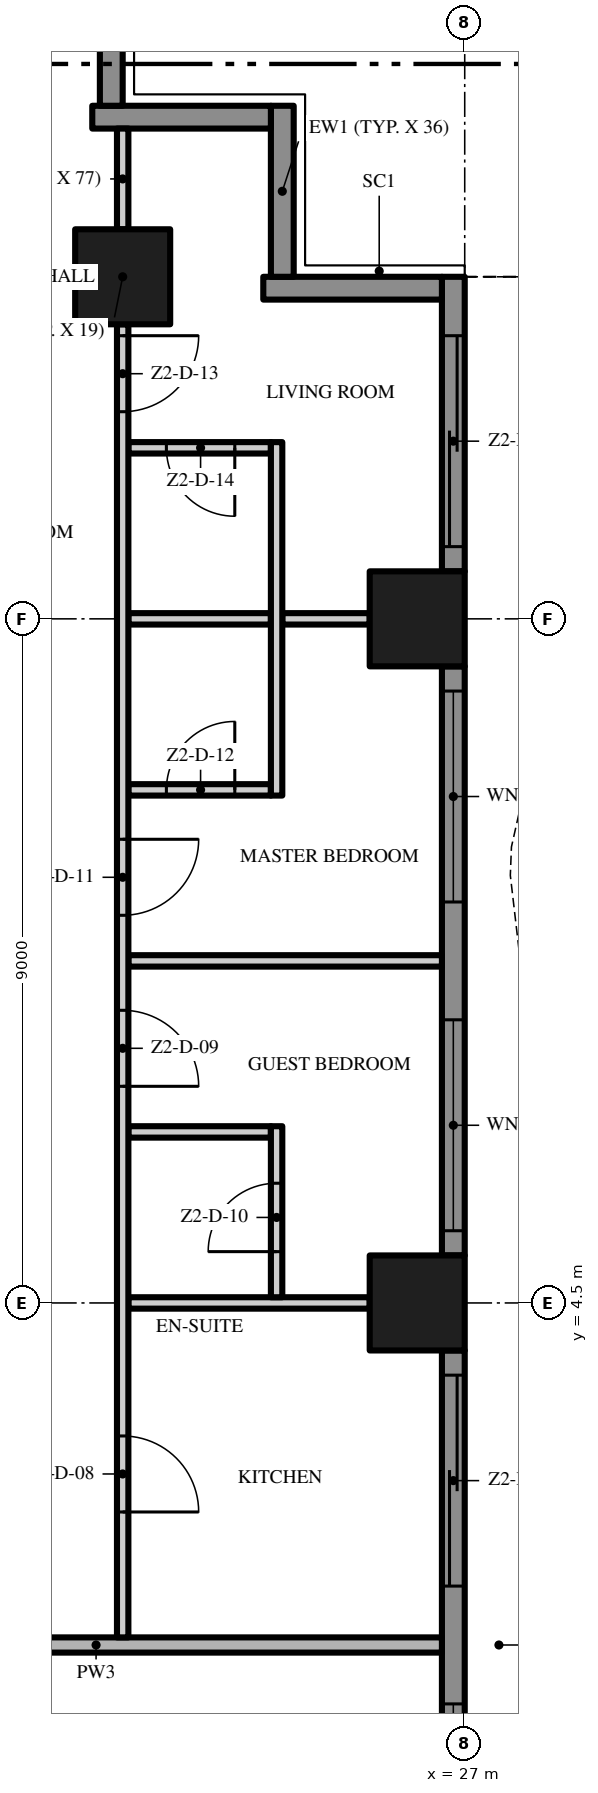
"""IFC4 building model, lengths in metres.
Left out: names, types, materials, properties, quantities, classifications, styles, units other than length and angle.
Written with IfcOpenShell. Run it as: python <this file> out.ifc"""

import sys

from ifc_helpers import new_model, si_unit, direction, frame, frame_2d, origin, origin_2d, place, context, subcontext, project, spatial, polyline, rectangle, outline, extrude, element, fill, save


model = new_model("IFC4")
c1 = context("Model", 3, precision=1e-05, world=origin(), true_north=direction((0.0, 1.0)))
c2 = subcontext(c1, "Body", "Model", "MODEL_VIEW")
j1 = project(units=[si_unit("LENGTHUNIT", "METRE"), si_unit("PLANEANGLEUNIT", "RADIAN")], contexts=[c1])
p1 = place(None, origin())
s1 = spatial("IfcSite", under=j1, at=p1, CompositionType="ELEMENT")
p2 = place(p1, origin())
s2 = spatial("IfcBuilding", under=s1, at=p2, CompositionType="ELEMENT")
p3 = place(p2, frame((0.0, 0.0, 103.6)))
s3 = spatial("IfcBuildingStorey", under=s2, at=p3, CompositionType="ELEMENT", Elevation=103.6)
for number, where, z_axis, x_axis in (
    (1, (26.375, 13.5, 0.0), (0.0, 0.0, 1.0), (1.0, 0.0, 0.0)),
    (2, (22.5, 18.0, 0.0), (0.0, 0.0, 1.0), (1.0, 0.0, 0.0)),
    (3, (26.375, 4.5, 0.0), (0.0, 0.0, 1.0), (1.0, 0.0, 0.0)),
):
    element("IfcColumn", number, at=place(p3, frame(where, z_axis=z_axis, x_axis=x_axis)), inside=s3, PredefinedType="COLUMN", context=c2, shape_type="SweptSolid", body=[
        extrude(rectangle(XDim=1.25, YDim=1.25, at=origin_2d()), origin(), (0.0, 0.0, 1.0), 3.5),
    ])
p4 = place(p3, frame((26.85, 3.875, 0.0), z_axis=(0.0, 0.0, 1.0), x_axis=(0.0, -1.0, 0.0)))
e4 = element("IfcWall", 4, at=p4, inside=s3, PredefinedType="SOLIDWALL", context=c2, shape_type="SweptSolid", body=[
    extrude(rectangle(XDim=7.75, YDim=0.3, at=frame_2d((3.875, 0.0))), origin(), (0.0, 0.0, 1.0), 3.5),
])
p5 = place(p4, frame((4.65, 0.0, 0.45)))
e5 = element("IfcOpeningElement", 5, at=p5, cuts=e4, PredefinedType="OPENING", context=c2, shape_type="SweptSolid", body=[
    extrude(rectangle(XDim=2.775, YDim=2.65, at=frame_2d((1.387, 1.325))), frame((0.0, 0.16, 0.0), z_axis=(0.0, -1.0, 0.0), x_axis=(1.0, 0.0, 0.0)), (0.0, 0.0, 1.0), 0.32),
])
p6 = place(p4, frame((0.325, 0.0, 0.0)))
e6 = element("IfcOpeningElement", 6, at=p6, cuts=e4, PredefinedType="OPENING", context=c2, shape_type="SweptSolid", body=[
    extrude(rectangle(XDim=2.775, YDim=2.4, at=frame_2d((1.387, 1.2))), frame((0.0, 0.16, 0.0), z_axis=(0.0, -1.0, 0.0), x_axis=(1.0, 0.0, 0.0)), (0.0, 0.0, 1.0), 0.32),
])
p7 = place(p3, frame((26.85, 12.875, 0.0), z_axis=(0.0, 0.0, 1.0), x_axis=(0.0, -1.0, 0.0)))
e7 = element("IfcWall", 7, at=p7, inside=s3, PredefinedType="SOLIDWALL", context=c2, shape_type="SweptSolid", body=[
    extrude(rectangle(XDim=7.75, YDim=0.3, at=frame_2d((3.875, 0.0))), origin(), (0.0, 0.0, 1.0), 3.5),
])
p8 = place(p7, frame((4.65, 0.0, 0.45)))
e8 = element("IfcOpeningElement", 8, at=p8, cuts=e7, PredefinedType="OPENING", context=c2, shape_type="SweptSolid", body=[
    extrude(rectangle(XDim=2.775, YDim=2.65, at=frame_2d((1.387, 1.325))), frame((0.0, 0.16, 0.0), z_axis=(0.0, -1.0, 0.0), x_axis=(1.0, 0.0, 0.0)), (0.0, 0.0, 1.0), 0.32),
])
p9 = place(p7, frame((0.325, 0.0, 0.45)))
e9 = element("IfcOpeningElement", 9, at=p9, cuts=e7, PredefinedType="OPENING", context=c2, shape_type="SweptSolid", body=[
    extrude(rectangle(XDim=2.775, YDim=2.65, at=frame_2d((1.387, 1.325))), frame((0.0, 0.16, 0.0), z_axis=(0.0, -1.0, 0.0), x_axis=(1.0, 0.0, 0.0)), (0.0, 0.0, 1.0), 0.32),
])
p10 = place(p3, frame((26.85, 18.0, 0.0), z_axis=(0.0, 0.0, 1.0), x_axis=(0.0, -1.0, 0.0)))
e10 = element("IfcWall", 10, at=p10, inside=s3, PredefinedType="SOLIDWALL", context=c2, shape_type="SweptSolid", body=[
    extrude(rectangle(XDim=3.875, YDim=0.3, at=frame_2d((1.938, 0.0))), origin(), (0.0, 0.0, 1.0), 3.5),
])
p11 = place(p10, frame((0.775, 0.0, 0.0)))
e11 = element("IfcOpeningElement", 11, at=p11, cuts=e10, PredefinedType="OPENING", context=c2, shape_type="SweptSolid", body=[
    extrude(rectangle(XDim=2.775, YDim=2.4, at=frame_2d((1.387, 1.2))), frame((0.0, 0.16, 0.0), z_axis=(0.0, -1.0, 0.0), x_axis=(1.0, 0.0, 0.0)), (0.0, 0.0, 1.0), 0.32),
])
p12 = place(p3, frame((24.35, 17.85, 0.0), z_axis=(0.0, 0.0, 1.0), x_axis=(1.0, 0.0, 0.0)))
e12 = element("IfcWall", 12, at=p12, inside=s3, PredefinedType="SOLIDWALL", context=c2, shape_type="SweptSolid", body=[
    extrude(rectangle(XDim=2.35, YDim=0.3, at=frame_2d((1.175, 0.0))), origin(), (0.0, 0.0, 1.0), 3.5),
])
p13 = place(p3, frame((24.6, 20.25, 0.0), z_axis=(0.0, 0.0, 1.0), x_axis=(0.0, -1.0, 0.0)))
e13 = element("IfcWall", 13, at=p13, inside=s3, PredefinedType="SOLIDWALL", context=c2, shape_type="SweptSolid", body=[
    extrude(rectangle(XDim=2.25, YDim=0.3, at=frame_2d((1.125, 0.0))), origin(), (0.0, 0.0, 1.0), 3.5),
])
p14 = place(p3, frame((22.1, 20.1, 0.0), z_axis=(0.0, 0.0, 1.0), x_axis=(1.0, 0.0, 0.0)))
e14 = element("IfcWall", 14, at=p14, inside=s3, PredefinedType="SOLIDWALL", context=c2, shape_type="SweptSolid", body=[
    extrude(rectangle(XDim=2.35, YDim=0.3, at=frame_2d((1.175, 0.0))), origin(), (0.0, 0.0, 1.0), 3.5),
])
p15 = place(p3, frame((22.35, 22.5, 0.0), z_axis=(0.0, 0.0, 1.0), x_axis=(0.0, -1.0, 0.0)))
e15 = element("IfcWall", 15, at=p15, inside=s3, PredefinedType="SOLIDWALL", context=c2, shape_type="SweptSolid", body=[
    extrude(rectangle(XDim=2.25, YDim=0.3, at=frame_2d((1.125, 0.0))), origin(), (0.0, 0.0, 1.0), 3.5),
])
p16 = place(p3, origin())
e16 = element("IfcWall", 16, at=p16, inside=s3, PredefinedType="USERDEFINED", context=c2, shape_type="SweptSolid", body=[
    extrude(outline(polyline([(27.951, -18.0), (28.612, -16.5), (29.345, -15.0), (29.869, -13.5), (30.0, -12.375), (29.985, -12.0), (29.649, -10.5), (28.988, -9.0), (28.255, -7.5), (27.731, -6.0), (27.6, -4.875), (27.615, -4.5), (27.951, -3.0), (28.612, -1.5), (29.345, 0.0), (29.869, 1.5), (30.0, 2.625), (29.985, 3.0), (29.649, 4.5), (28.988, 6.0), (28.255, 7.5), (27.731, 9.0), (27.6, 10.125), (27.615, 10.5), (27.951, 12.0), (28.612, 13.5), (29.345, 15.0), (29.869, 16.5), (30.0, 17.625), (29.985, 18.0), (29.735, 17.99), (29.749, 17.635), (29.624, 16.556), (29.114, 15.096), (28.385, 13.605), (27.713, 12.079), (27.366, 10.533), (27.349, 10.115), (27.486, 8.944), (28.024, 7.404), (28.761, 5.895), (29.41, 4.421), (29.736, 2.967), (29.749, 2.635), (29.624, 1.556), (29.114, 0.096), (28.385, -1.395), (27.713, -2.921), (27.366, -4.467), (27.349, -4.885), (27.486, -6.056), (28.024, -7.596), (28.761, -9.105), (29.41, -10.579), (29.736, -12.033), (29.749, -12.365), (29.624, -13.444), (29.114, -14.904), (28.385, -16.395), (27.723, -17.899), (27.951, -18.0)])), origin(), (0.0, 0.0, 1.0), 0.9),
])
p17 = place(p3, frame((17.6, 0.0, 0.0), z_axis=(0.0, 0.0, 1.0), x_axis=(1.0, 0.0, 0.0)))
e17 = element("IfcWall", 17, at=p17, inside=s3, PredefinedType="PARTITIONING", context=c2, shape_type="SweptSolid", body=[
    extrude(rectangle(XDim=9.1, YDim=0.2, at=frame_2d((4.55, 0.0))), origin(), (0.0, 0.0, 1.0), 3.5),
])
p18 = place(p3, frame((22.575, 4.5, 0.0), z_axis=(0.0, 0.0, 1.0), x_axis=(1.0, 0.0, 0.0)))
e18 = element("IfcWall", 18, at=p18, inside=s3, PredefinedType="PARTITIONING", context=c2, shape_type="SweptSolid", body=[
    extrude(rectangle(XDim=3.175, YDim=0.15, at=frame_2d((1.587, 0.0))), origin(), (0.0, 0.0, 1.0), 3.5),
])
p19 = place(p3, frame((22.575, 6.75, 0.0), z_axis=(0.0, 0.0, 1.0), x_axis=(1.0, 0.0, 0.0)))
e19 = element("IfcWall", 19, at=p19, inside=s3, PredefinedType="PARTITIONING", context=c2, shape_type="SweptSolid", body=[
    extrude(rectangle(XDim=1.875, YDim=0.15, at=frame_2d((0.938, 0.0))), origin(), (0.0, 0.0, 1.0), 3.5),
])
p20 = place(p3, frame((22.575, 9.0, 0.0), z_axis=(0.0, 0.0, 1.0), x_axis=(1.0, 0.0, 0.0)))
e20 = element("IfcWall", 20, at=p20, inside=s3, PredefinedType="PARTITIONING", context=c2, shape_type="SweptSolid", body=[
    extrude(rectangle(XDim=4.125, YDim=0.15, at=frame_2d((2.062, 0.0))), origin(), (0.0, 0.0, 1.0), 3.5),
])
p21 = place(p3, frame((22.575, 11.25, 0.0), z_axis=(0.0, 0.0, 1.0), x_axis=(1.0, 0.0, 0.0)))
e21 = element("IfcWall", 21, at=p21, inside=s3, PredefinedType="PARTITIONING", context=c2, shape_type="SweptSolid", body=[
    extrude(rectangle(XDim=1.875, YDim=0.15, at=frame_2d((0.938, 0.0))), origin(), (0.0, 0.0, 1.0), 3.5),
])
p22 = place(p21, frame((0.5, 0.0, 0.0)))
e22 = element("IfcOpeningElement", 22, at=p22, cuts=e21, PredefinedType="OPENING", context=c2, shape_type="SweptSolid", body=[
    extrude(rectangle(XDim=0.9, YDim=2.1, at=frame_2d((0.45, 1.05))), frame((0.0, 0.085, 0.0), z_axis=(0.0, -1.0, 0.0), x_axis=(1.0, 0.0, 0.0)), (0.0, 0.0, 1.0), 0.17),
])
p23 = place(p3, frame((22.575, 13.5, 0.0), z_axis=(0.0, 0.0, 1.0), x_axis=(1.0, 0.0, 0.0)))
e23 = element("IfcWall", 23, at=p23, inside=s3, PredefinedType="PARTITIONING", context=c2, shape_type="SweptSolid", body=[
    extrude(rectangle(XDim=1.875, YDim=0.15, at=frame_2d((0.938, 0.0))), origin(), (0.0, 0.0, 1.0), 3.5),
])
p24 = place(p3, frame((24.6, 13.5, 0.0), z_axis=(0.0, 0.0, 1.0), x_axis=(1.0, 0.0, 0.0)))
e24 = element("IfcWall", 24, at=p24, inside=s3, PredefinedType="PARTITIONING", context=c2, shape_type="SweptSolid", body=[
    extrude(rectangle(XDim=1.15, YDim=0.15, at=frame_2d((0.575, 0.0))), origin(), (0.0, 0.0, 1.0), 3.5),
])
p25 = place(p3, frame((24.45, 15.75, 0.0), z_axis=(0.0, 0.0, 1.0), x_axis=(-1.0, 0.0, 0.0)))
e25 = element("IfcWall", 25, at=p25, inside=s3, PredefinedType="PARTITIONING", context=c2, shape_type="SweptSolid", body=[
    extrude(rectangle(XDim=1.875, YDim=0.15, at=frame_2d((0.938, 0.0))), origin(), (0.0, 0.0, 1.0), 3.5),
])
p26 = place(p25, frame((0.475, 0.0, 0.0)))
e26 = element("IfcOpeningElement", 26, at=p26, cuts=e25, PredefinedType="OPENING", context=c2, shape_type="SweptSolid", body=[
    extrude(rectangle(XDim=0.9, YDim=2.1, at=frame_2d((0.45, 1.05))), frame((0.0, 0.085, 0.0), z_axis=(0.0, -1.0, 0.0), x_axis=(1.0, 0.0, 0.0)), (0.0, 0.0, 1.0), 0.17),
])
p27 = place(p3, frame((22.5, 17.375, 0.0), z_axis=(0.0, 0.0, 1.0), x_axis=(0.0, -1.0, 0.0)))
e27 = element("IfcWall", 27, at=p27, inside=s3, PredefinedType="PARTITIONING", context=c2, shape_type="SweptSolid", body=[
    extrude(rectangle(XDim=17.275, YDim=0.15, at=frame_2d((8.637, 0.0))), origin(), (0.0, 0.0, 1.0), 3.5),
])
p28 = place(p27, frame((14.625, 0.0, 0.0)))
e28 = element("IfcOpeningElement", 28, at=p28, cuts=e27, PredefinedType="OPENING", context=c2, shape_type="SweptSolid", body=[
    extrude(rectangle(XDim=1.0, YDim=2.4, at=frame_2d((0.5, 1.2))), frame((0.0, 0.085, 0.0), z_axis=(0.0, -1.0, 0.0), x_axis=(1.0, 0.0, 0.0)), (0.0, 0.0, 1.0), 0.17),
])
p29 = place(p27, frame((9.025, 0.0, 0.0)))
e29 = element("IfcOpeningElement", 29, at=p29, cuts=e27, PredefinedType="OPENING", context=c2, shape_type="SweptSolid", body=[
    extrude(rectangle(XDim=1.0, YDim=2.4, at=frame_2d((0.5, 1.2))), frame((0.0, 0.085, 0.0), z_axis=(0.0, -1.0, 0.0), x_axis=(1.0, 0.0, 0.0)), (0.0, 0.0, 1.0), 0.17),
])
p30 = place(p27, frame((6.775, 0.0, 0.0)))
e30 = element("IfcOpeningElement", 30, at=p30, cuts=e27, PredefinedType="OPENING", context=c2, shape_type="SweptSolid", body=[
    extrude(rectangle(XDim=1.0, YDim=2.4, at=frame_2d((0.5, 1.2))), frame((0.0, 0.085, 0.0), z_axis=(0.0, -1.0, 0.0), x_axis=(1.0, 0.0, 0.0)), (0.0, 0.0, 1.0), 0.17),
])
p31 = place(p27, frame((0.15, 0.0, 0.0)))
e31 = element("IfcOpeningElement", 31, at=p31, cuts=e27, PredefinedType="OPENING", context=c2, shape_type="SweptSolid", body=[
    extrude(rectangle(XDim=1.0, YDim=2.4, at=frame_2d((0.5, 1.2))), frame((0.0, 0.085, 0.0), z_axis=(0.0, -1.0, 0.0), x_axis=(1.0, 0.0, 0.0)), (0.0, 0.0, 1.0), 0.17),
])
p32 = place(p3, frame((22.5, 18.625, 0.0), z_axis=(0.0, 0.0, 1.0), x_axis=(0.0, 1.0, 0.0)))
e32 = element("IfcWall", 32, at=p32, inside=s3, PredefinedType="PARTITIONING", context=c2, shape_type="SweptSolid", body=[
    extrude(rectangle(XDim=1.325, YDim=0.15, at=frame_2d((0.662, 0.0))), origin(), (0.0, 0.0, 1.0), 3.5),
])
p33 = place(p3, frame((24.525, 4.575, 0.0), z_axis=(0.0, 0.0, 1.0), x_axis=(0.0, 1.0, 0.0)))
e33 = element("IfcWall", 33, at=p33, inside=s3, PredefinedType="PARTITIONING", context=c2, shape_type="SweptSolid", body=[
    extrude(rectangle(XDim=2.25, YDim=0.15, at=frame_2d((1.125, 0.0))), origin(), (0.0, 0.0, 1.0), 3.5),
])
p34 = place(p33, frame((0.6, 0.0, 0.0)))
e34 = element("IfcOpeningElement", 34, at=p34, cuts=e33, PredefinedType="OPENING", context=c2, shape_type="SweptSolid", body=[
    extrude(rectangle(XDim=0.9, YDim=2.1, at=frame_2d((0.45, 1.05))), frame((0.0, 0.085, 0.0), z_axis=(0.0, -1.0, 0.0), x_axis=(1.0, 0.0, 0.0)), (0.0, 0.0, 1.0), 0.17),
])
p35 = place(p3, frame((24.525, 11.175, 0.0), z_axis=(0.0, 0.0, 1.0), x_axis=(0.0, 1.0, 0.0)))
e35 = element("IfcWall", 35, at=p35, inside=s3, PredefinedType="PARTITIONING", context=c2, shape_type="SweptSolid", body=[
    extrude(rectangle(XDim=4.65, YDim=0.15, at=frame_2d((2.325, 0.0))), origin(), (0.0, 0.0, 1.0), 3.5),
])
p36 = place(p5, origin())
e36 = element("IfcWindow", 36, at=p36, inside=s3, PartitioningType="SINGLE_PANEL", PredefinedType="WINDOW", context=c2, shape_type="SweptSolid", body=[
    extrude(rectangle(XDim=2.775, YDim=2.65, at=frame_2d((1.387, 1.325))), frame((0.0, 0.03, 0.0), z_axis=(0.0, -1.0, 0.0), x_axis=(1.0, 0.0, 0.0)), (0.0, 0.0, 1.0), 0.06),
])
fill(e5, e36)
p37 = place(p6, origin())
e37 = element("IfcDoor", 37, at=p37, inside=s3, OperationType="SINGLE_SWING_LEFT", PredefinedType="DOOR", context=c2, shape_type="SweptSolid", body=[
    extrude(rectangle(XDim=2.775, YDim=2.4, at=frame_2d((1.387, 1.2))), frame((0.0, 0.025, 0.0), z_axis=(0.0, -1.0, 0.0), x_axis=(1.0, 0.0, 0.0)), (0.0, 0.0, 1.0), 0.05),
])
fill(e6, e37)
p38 = place(p8, origin())
e38 = element("IfcWindow", 38, at=p38, inside=s3, PartitioningType="SINGLE_PANEL", PredefinedType="WINDOW", context=c2, shape_type="SweptSolid", body=[
    extrude(rectangle(XDim=2.775, YDim=2.65, at=frame_2d((1.387, 1.325))), frame((0.0, 0.03, 0.0), z_axis=(0.0, -1.0, 0.0), x_axis=(1.0, 0.0, 0.0)), (0.0, 0.0, 1.0), 0.06),
])
fill(e8, e38)
p39 = place(p9, origin())
e39 = element("IfcWindow", 39, at=p39, inside=s3, PartitioningType="SINGLE_PANEL", PredefinedType="WINDOW", context=c2, shape_type="SweptSolid", body=[
    extrude(rectangle(XDim=2.775, YDim=2.65, at=frame_2d((1.387, 1.325))), frame((0.0, 0.03, 0.0), z_axis=(0.0, -1.0, 0.0), x_axis=(1.0, 0.0, 0.0)), (0.0, 0.0, 1.0), 0.06),
])
fill(e9, e39)
p40 = place(p11, origin())
e40 = element("IfcDoor", 40, at=p40, inside=s3, OperationType="SINGLE_SWING_LEFT", PredefinedType="DOOR", context=c2, shape_type="SweptSolid", body=[
    extrude(rectangle(XDim=2.775, YDim=2.4, at=frame_2d((1.387, 1.2))), frame((0.0, 0.025, 0.0), z_axis=(0.0, -1.0, 0.0), x_axis=(1.0, 0.0, 0.0)), (0.0, 0.0, 1.0), 0.05),
])
fill(e11, e40)
p41 = place(p28, origin())
e41 = element("IfcDoor", 41, at=p41, inside=s3, OperationType="SINGLE_SWING_RIGHT", PredefinedType="DOOR", context=c2, shape_type="SweptSolid", body=[
    extrude(rectangle(XDim=1.0, YDim=2.4, at=frame_2d((0.5, 1.2))), frame((0.0, 0.025, 0.0), z_axis=(0.0, -1.0, 0.0), x_axis=(1.0, 0.0, 0.0)), (0.0, 0.0, 1.0), 0.05),
])
fill(e28, e41)
p42 = place(p29, origin())
e42 = element("IfcDoor", 42, at=p42, inside=s3, OperationType="SINGLE_SWING_RIGHT", PredefinedType="DOOR", context=c2, shape_type="SweptSolid", body=[
    extrude(rectangle(XDim=1.0, YDim=2.4, at=frame_2d((0.5, 1.2))), frame((0.0, 0.025, 0.0), z_axis=(0.0, -1.0, 0.0), x_axis=(1.0, 0.0, 0.0)), (0.0, 0.0, 1.0), 0.05),
])
fill(e29, e42)
p43 = place(p34, origin())
e43 = element("IfcDoor", 43, at=p43, inside=s3, OperationType="SINGLE_SWING_LEFT", PredefinedType="DOOR", context=c2, shape_type="SweptSolid", body=[
    extrude(rectangle(XDim=0.9, YDim=2.1, at=frame_2d((0.45, 1.05))), frame((0.0, 0.025, 0.0), z_axis=(0.0, -1.0, 0.0), x_axis=(1.0, 0.0, 0.0)), (0.0, 0.0, 1.0), 0.05),
])
fill(e34, e43)
p44 = place(p30, origin())
e44 = element("IfcDoor", 44, at=p44, inside=s3, OperationType="SINGLE_SWING_LEFT", PredefinedType="DOOR", context=c2, shape_type="SweptSolid", body=[
    extrude(rectangle(XDim=1.0, YDim=2.4, at=frame_2d((0.5, 1.2))), frame((0.0, 0.025, 0.0), z_axis=(0.0, -1.0, 0.0), x_axis=(1.0, 0.0, 0.0)), (0.0, 0.0, 1.0), 0.05),
])
fill(e30, e44)
p45 = place(p22, origin())
e45 = element("IfcDoor", 45, at=p45, inside=s3, OperationType="SINGLE_SWING_RIGHT", PredefinedType="DOOR", context=c2, shape_type="SweptSolid", body=[
    extrude(rectangle(XDim=0.9, YDim=2.1, at=frame_2d((0.45, 1.05))), frame((0.0, 0.025, 0.0), z_axis=(0.0, -1.0, 0.0), x_axis=(1.0, 0.0, 0.0)), (0.0, 0.0, 1.0), 0.05),
])
fill(e22, e45)
p46 = place(p31, origin())
e46 = element("IfcDoor", 46, at=p46, inside=s3, OperationType="SINGLE_SWING_LEFT", PredefinedType="DOOR", context=c2, shape_type="SweptSolid", body=[
    extrude(rectangle(XDim=1.0, YDim=2.4, at=frame_2d((0.5, 1.2))), frame((0.0, 0.025, 0.0), z_axis=(0.0, -1.0, 0.0), x_axis=(1.0, 0.0, 0.0)), (0.0, 0.0, 1.0), 0.05),
])
fill(e31, e46)
p47 = place(p26, origin())
e47 = element("IfcDoor", 47, at=p47, inside=s3, OperationType="SINGLE_SWING_LEFT", PredefinedType="DOOR", context=c2, shape_type="SweptSolid", body=[
    extrude(rectangle(XDim=0.9, YDim=2.1, at=frame_2d((0.45, 1.05))), frame((0.0, 0.025, 0.0), z_axis=(0.0, -1.0, 0.0), x_axis=(1.0, 0.0, 0.0)), (0.0, 0.0, 1.0), 0.05),
])
fill(e26, e47)
save(model, sys.argv[1])
